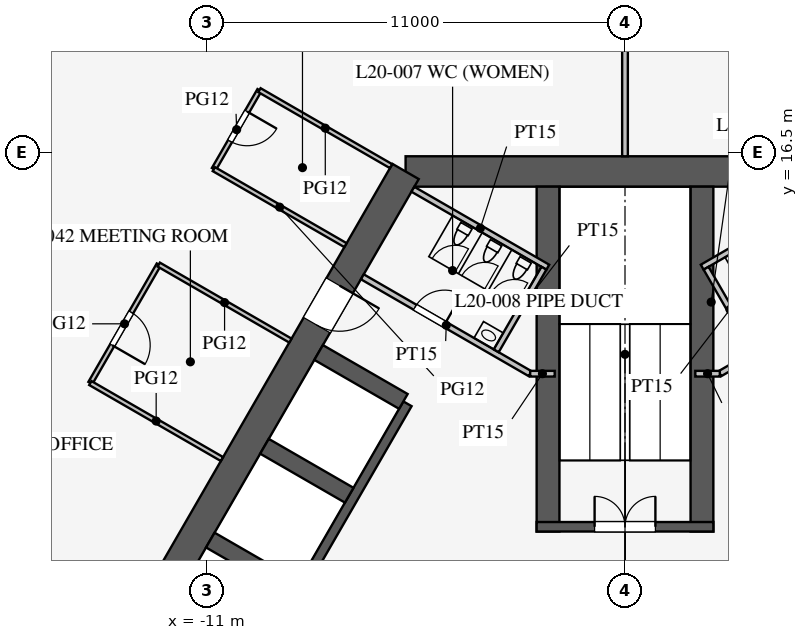
"""IFC4 building model, lengths in metres.
Left out: names, types, materials, properties, quantities, classifications, styles, units other than length and angle.
Written with IfcOpenShell. Run it as: python <this file> out.ifc"""

import sys

from ifc_helpers import new_model, si_unit, direction, frame, frame_2d, origin, place, context, subcontext, project, spatial, rectangle, extrude, element, fill, save


model = new_model("IFC4")
c1 = context("Model", 3, precision=1e-05, world=origin(), true_north=direction((0.0, 1.0)))
c2 = subcontext(c1, "Body", "Model", "MODEL_VIEW")
j1 = project(units=[si_unit("LENGTHUNIT", "METRE"), si_unit("PLANEANGLEUNIT", "RADIAN")], contexts=[c1])
p1 = place(None, origin())
s1 = spatial("IfcSite", under=j1, at=p1, CompositionType="ELEMENT")
p2 = place(p1, origin())
s2 = spatial("IfcBuilding", under=s1, at=p2, CompositionType="ELEMENT")
p3 = place(p2, frame((0.0, 0.0, 87.9)))
s3 = spatial("IfcBuildingStorey", under=s2, at=p3, CompositionType="ELEMENT", Elevation=87.9)
p4 = place(p3, frame((5.773, 16.0, 0.0), z_axis=(0.0, 0.0, 1.0), x_axis=(-1.0, 0.0, 0.0)))
e1 = element("IfcWall", 1, at=p4, inside=s3, PredefinedType="SHEAR", context=c2, shape_type="SweptSolid", body=[
    extrude(rectangle(XDim=11.547, YDim=0.8, at=frame_2d((5.773, 0.0))), origin(), (0.0, 0.0, 1.0), 4.2),
])
p5 = place(p3, frame((-5.773, 16.0, 0.0), z_axis=(0.0, 0.0, 1.0), x_axis=(-0.500002442456, -0.866023993627, 0.0)))
e2 = element("IfcWall", 2, at=p5, inside=s3, PredefinedType="SHEAR", context=c2, shape_type="SweptSolid", body=[
    extrude(rectangle(XDim=21.939, YDim=0.8, at=frame_2d((10.97, 0.0))), origin(), (0.0, 0.0, 1.0), 4.2),
])
p6 = place(p5, frame((17.27, 0.0, 0.0)))
e3 = element("IfcOpeningElement", 3, at=p6, cuts=e2, PredefinedType="OPENING", context=c2, shape_type="SweptSolid", body=[
    extrude(rectangle(XDim=1.2, YDim=2.1, at=frame_2d((0.6, 1.05))), frame((0.0, 0.41, 0.0), z_axis=(0.0, -1.0, 0.0), x_axis=(1.0, 0.0, 0.0)), (0.0, 0.0, 1.0), 0.82),
])
p7 = place(p5, frame((3.47, 0.0, 0.0)))
e4 = element("IfcOpeningElement", 4, at=p7, cuts=e2, PredefinedType="OPENING", context=c2, shape_type="SweptSolid", body=[
    extrude(rectangle(XDim=1.2, YDim=2.1, at=frame_2d((0.6, 1.05))), frame((0.0, 0.41, 0.0), z_axis=(0.0, -1.0, 0.0), x_axis=(1.0, 0.0, 0.0)), (0.0, 0.0, 1.0), 0.82),
])
p8 = place(p3, frame((-5.724, 9.886, 0.0), z_axis=(0.0, 0.0, 1.0), x_axis=(-0.500001763848, -0.866024385424, 0.0)))
e5 = element("IfcWall", 5, at=p8, inside=s3, PredefinedType="SHEAR", context=c2, shape_type="SweptSolid", body=[
    extrude(rectangle(XDim=11.4, YDim=0.25, at=frame_2d((5.7, 0.0))), origin(), (0.0, 0.0, 1.0), 4.2),
])
p9 = place(p8, frame((6.525, 0.0, 0.0)))
e6 = element("IfcOpeningElement", 6, at=p9, cuts=e5, PredefinedType="OPENING", context=c2, shape_type="SweptSolid", body=[
    extrude(rectangle(XDim=1.2, YDim=2.2, at=frame_2d((0.6, 1.1))), frame((0.0, 0.135, 0.0), z_axis=(0.0, -1.0, 0.0), x_axis=(1.0, 0.0, 0.0)), (0.0, 0.0, 1.0), 0.27),
])
p10 = place(p8, frame((9.375, 0.0, 0.0)))
e7 = element("IfcOpeningElement", 7, at=p10, cuts=e5, PredefinedType="OPENING", context=c2, shape_type="SweptSolid", body=[
    extrude(rectangle(XDim=1.2, YDim=2.2, at=frame_2d((0.6, 1.1))), frame((0.0, 0.135, 0.0), z_axis=(0.0, -1.0, 0.0), x_axis=(1.0, 0.0, 0.0)), (0.0, 0.0, 1.0), 0.27),
])
p11 = place(p3, frame((-5.832, 9.949, 0.0), z_axis=(0.0, 0.0, 1.0), x_axis=(-0.866029291668, 0.499993265928, 0.0)))
e8 = element("IfcWall", 8, at=p11, inside=s3, PredefinedType="SHEAR", context=c2, shape_type="SweptSolid", body=[
    extrude(rectangle(XDim=2.575, YDim=0.45, at=frame_2d((1.288, 0.0))), origin(), (0.0, 0.0, 1.0), 4.2),
])
for number, where, z_axis, x_axis in (
    (9, (-7.257, 7.481, 0.0), (0.0, 0.0, 1.0), (-0.866, 0.5, 0.0)),
    (10, (-8.682, 5.012, 0.0), (0.0, 0.0, 1.0), (-0.866, 0.5, 0.0)),
):
    element("IfcWall", number, at=place(p3, frame(where, z_axis=z_axis, x_axis=x_axis)), inside=s3, PredefinedType="SHEAR", context=c2, shape_type="SweptSolid", body=[
        extrude(rectangle(XDim=2.575, YDim=0.45, at=frame_2d((1.288, 0.0))), origin(), (0.0, 0.0, 1.0), 4.2),
    ])
for number, where, z_axis, x_axis in (
    (11, (2.025, 6.525, 0.0), (0.0, 0.0, 1.0), (0.0, 1.0, 0.0)),
    (12, (-2.025, 6.525, 0.0), (0.0, 0.0, 1.0), (0.0, 1.0, 0.0)),
):
    element("IfcWall", number, at=place(p3, frame(where, z_axis=z_axis, x_axis=x_axis)), inside=s3, PredefinedType="SHEAR", context=c2, shape_type="SweptSolid", body=[
        extrude(rectangle(XDim=9.075, YDim=0.6, at=frame_2d((4.538, 0.0))), origin(), (0.0, 0.0, 1.0), 4.2),
    ])
p12 = place(p3, frame((2.325, 6.65, 0.0), z_axis=(0.0, 0.0, 1.0), x_axis=(-1.0, 0.0, 0.0)))
e13 = element("IfcWall", 13, at=p12, inside=s3, PredefinedType="SHEAR", context=c2, shape_type="SweptSolid", body=[
    extrude(rectangle(XDim=4.65, YDim=0.25, at=frame_2d((2.325, 0.0))), origin(), (0.0, 0.0, 1.0), 4.2),
])
p13 = place(p12, frame((1.525, 0.0, 0.0)))
e14 = element("IfcOpeningElement", 14, at=p13, cuts=e13, PredefinedType="OPENING", context=c2, shape_type="SweptSolid", body=[
    extrude(rectangle(XDim=1.6, YDim=2.1, at=frame_2d((0.8, 1.05))), frame((0.0, 0.135, 0.0), z_axis=(0.0, -1.0, 0.0), x_axis=(1.0, 0.0, 0.0)), (0.0, 0.0, 1.0), 0.27),
])
p14 = place(p3, frame((2.495, 10.678, 0.0), z_axis=(0.0, 0.0, 1.0), x_axis=(0.86602216432, 0.500005610874, 0.0)))
e15 = element("IfcWall", 15, at=p14, inside=s3, PredefinedType="PARTITIONING", context=c2, shape_type="SweptSolid", body=[
    extrude(rectangle(XDim=5.1, YDim=0.15, at=frame_2d((2.55, 0.0))), origin(), (0.0, 0.0, 1.0), 3.95),
])
p15 = place(p14, frame((1.3, 0.0, 0.0)))
e16 = element("IfcOpeningElement", 16, at=p15, cuts=e15, PredefinedType="OPENING", context=c2, shape_type="SweptSolid", body=[
    extrude(rectangle(XDim=0.9, YDim=2.1, at=frame_2d((0.45, 1.05))), frame((0.0, 0.085, 0.0), z_axis=(0.0, -1.0, 0.0), x_axis=(1.0, 0.0, 0.0)), (0.0, 0.0, 1.0), 0.17),
])
p16 = place(p3, frame((-2.495, 10.678, 0.0), z_axis=(0.0, 0.0, 1.0), x_axis=(-0.86602216432, 0.500005610874, 0.0)))
e17 = element("IfcWall", 17, at=p16, inside=s3, PredefinedType="PARTITIONING", context=c2, shape_type="SweptSolid", body=[
    extrude(rectangle(XDim=5.1, YDim=0.15, at=frame_2d((2.55, 0.0))), origin(), (0.0, 0.0, 1.0), 3.95),
])
p17 = place(p16, frame((2.6, 0.0, 0.0)))
e18 = element("IfcOpeningElement", 18, at=p17, cuts=e17, PredefinedType="OPENING", context=c2, shape_type="SweptSolid", body=[
    extrude(rectangle(XDim=0.9, YDim=2.1, at=frame_2d((0.45, 1.05))), frame((0.0, 0.085, 0.0), z_axis=(0.0, -1.0, 0.0), x_axis=(1.0, 0.0, 0.0)), (0.0, 0.0, 1.0), 0.17),
])
for number, where, z_axis, x_axis in (
    (19, (2.495, 10.678, 0.0), (0.0, 0.0, 1.0), (-1.0, 0.0, 0.0)),
    (20, (-2.495, 10.678, 0.0), (0.0, 0.0, 1.0), (1.0, 0.0, 0.0)),
):
    element("IfcWall", number, at=place(p3, frame(where, z_axis=z_axis, x_axis=x_axis)), inside=s3, PredefinedType="PARTITIONING", context=c2, shape_type="SweptSolid", body=[
        extrude(rectangle(XDim=0.645, YDim=0.15, at=frame_2d((0.323, 0.0))), origin(), (0.0, 0.0, 1.0), 3.95),
    ])
p18 = place(p3, frame((2.031, 13.482, 0.0), z_axis=(0.0, 0.0, 1.0), x_axis=(0.866050731258, 0.499956128963, 0.0)))
e21 = element("IfcWall", 21, at=p18, inside=s3, PredefinedType="PARTITIONING", context=c2, shape_type="SweptSolid", body=[
    extrude(rectangle(XDim=4.1, YDim=0.15, at=frame_2d((2.05, 0.0))), origin(), (0.0, 0.0, 1.0), 3.95),
])
p19 = place(p3, frame((3.389, 11.281, 0.0), z_axis=(0.0, 0.0, 1.0), x_axis=(-0.499989096993, 0.866031698547, 0.0)))
e22 = element("IfcWall", 22, at=p19, inside=s3, PredefinedType="PARTITIONING", context=c2, shape_type="SweptSolid", body=[
    extrude(rectangle(XDim=2.51, YDim=0.15, at=frame_2d((1.255, 0.0))), origin(), (0.0, 0.0, 1.0), 3.95),
])
p20 = place(p3, frame((-2.031, 13.482, 0.0), z_axis=(0.0, 0.0, 1.0), x_axis=(-0.866050731258, 0.499956128963, 0.0)))
e23 = element("IfcWall", 23, at=p20, inside=s3, PredefinedType="PARTITIONING", context=c2, shape_type="SweptSolid", body=[
    extrude(rectangle(XDim=4.1, YDim=0.15, at=frame_2d((2.05, 0.0))), origin(), (0.0, 0.0, 1.0), 3.95),
])
p21 = place(p3, frame((-3.389, 11.281, 0.0), z_axis=(0.0, 0.0, 1.0), x_axis=(0.499989096993, 0.866031698547, 0.0)))
e24 = element("IfcWall", 24, at=p21, inside=s3, PredefinedType="PARTITIONING", context=c2, shape_type="SweptSolid", body=[
    extrude(rectangle(XDim=2.51, YDim=0.15, at=frame_2d((1.255, 0.0))), origin(), (0.0, 0.0, 1.0), 3.95),
])
p22 = place(p3, frame((0.0, 16.4, 0.0), z_axis=(0.0, 0.0, 1.0), x_axis=(0.0, 1.0, 0.0)))
e25 = element("IfcWall", 25, at=p22, inside=s3, PredefinedType="PARTITIONING", context=c2, shape_type="SweptSolid", body=[
    extrude(rectangle(XDim=18.25, YDim=0.15, at=frame_2d((9.125, 0.0))), origin(), (0.0, 0.0, 1.0), 1.95),
])
p23 = place(p3, frame((-9.619, 18.14, 0.0), z_axis=(0.0, 0.0, 1.0), x_axis=(-0.500001309137, -0.866024647952, 0.0)))
e26 = element("IfcWall", 26, at=p23, inside=s3, PredefinedType="PARTITIONING", context=c2, shape_type="SweptSolid", body=[
    extrude(rectangle(XDim=2.4, YDim=0.12, at=frame_2d((1.2, 0.0))), origin(), (0.0, 0.0, 1.0), 2.9),
])
p24 = place(p23, frame((0.65, 0.0, 0.15)))
e27 = element("IfcOpeningElement", 27, at=p24, cuts=e26, PredefinedType="OPENING", context=c2, shape_type="SweptSolid", body=[
    extrude(rectangle(XDim=0.9, YDim=2.1, at=frame_2d((0.45, 1.05))), frame((0.0, 0.07, 0.0), z_axis=(0.0, -1.0, 0.0), x_axis=(1.0, 0.0, 0.0)), (0.0, 0.0, 1.0), 0.14),
])
p25 = place(p3, frame((-12.269, 13.55, 0.0), z_axis=(0.0, 0.0, 1.0), x_axis=(-0.500012057535, -0.866018442252, 0.0)))
e28 = element("IfcWall", 28, at=p25, inside=s3, PredefinedType="PARTITIONING", context=c2, shape_type="SweptSolid", body=[
    extrude(rectangle(XDim=3.6, YDim=0.12, at=frame_2d((1.8, 0.0))), origin(), (0.0, 0.0, 1.0), 2.9),
])
p26 = place(p25, frame((1.45, 0.0, 0.15)))
e29 = element("IfcOpeningElement", 29, at=p26, cuts=e28, PredefinedType="OPENING", context=c2, shape_type="SweptSolid", body=[
    extrude(rectangle(XDim=1.0, YDim=2.1, at=frame_2d((0.5, 1.05))), frame((0.0, 0.07, 0.0), z_axis=(0.0, -1.0, 0.0), x_axis=(1.0, 0.0, 0.0)), (0.0, 0.0, 1.0), 0.14),
])
for number, where, z_axis, x_axis in (
    (30, (-6.155, 16.14, 0.0), (0.0, 0.0, 1.0), (-0.866, 0.5, 0.0)),
    (31, (-10.605, 8.432, 0.0), (0.0, 0.0, 1.0), (-0.866, 0.5, 0.0)),
    (32, (-8.805, 11.55, 0.0), (0.0, 0.0, 1.0), (-0.866, 0.5, 0.0)),
    (33, (-7.355, 14.061, 0.0), (0.0, 0.0, 1.0), (-0.866, 0.5, 0.0)),
):
    element("IfcWall", number, at=place(p3, frame(where, z_axis=z_axis, x_axis=x_axis)), inside=s3, PredefinedType="PARTITIONING", context=c2, shape_type="SweptSolid", body=[
        extrude(rectangle(XDim=4.0, YDim=0.12, at=frame_2d((2.0, 0.0))), origin(), (0.0, 0.0, 1.0), 2.9),
    ])
p27 = place(p17, frame((0.9, 0.0, 0.0), z_axis=(0.0, 0.0, 1.0), x_axis=(-1.0, 0.0, 0.0)))
e34 = element("IfcDoor", 34, at=p27, inside=s3, OperationType="SINGLE_SWING_RIGHT", PredefinedType="DOOR", context=c2, shape_type="SweptSolid", body=[
    extrude(rectangle(XDim=0.9, YDim=2.1, at=frame_2d((0.45, 1.05))), frame((0.0, 0.025, 0.0), z_axis=(0.0, -1.0, 0.0), x_axis=(1.0, 0.0, 0.0)), (0.0, 0.0, 1.0), 0.05),
])
fill(e18, e34)
p28 = place(p13, frame((1.6, 0.0, 0.0), z_axis=(0.0, 0.0, 1.0), x_axis=(-1.0, 0.0, 0.0)))
e35 = element("IfcDoor", 35, at=p28, inside=s3, OperationType="DOUBLE_DOOR_SINGLE_SWING", PredefinedType="DOOR", context=c2, shape_type="SweptSolid", body=[
    extrude(rectangle(XDim=1.6, YDim=2.1, at=frame_2d((0.8, 1.05))), frame((0.0, 0.025, 0.0), z_axis=(0.0, -1.0, 0.0), x_axis=(1.0, 0.0, 0.0)), (0.0, 0.0, 1.0), 0.05),
])
fill(e14, e35)
p29 = place(p7, origin())
e36 = element("IfcDoor", 36, at=p29, inside=s3, OperationType="SINGLE_SWING_LEFT", PredefinedType="DOOR", context=c2, shape_type="SweptSolid", body=[
    extrude(rectangle(XDim=1.2, YDim=2.1, at=frame_2d((0.6, 1.05))), frame((0.0, 0.025, 0.0), z_axis=(0.0, -1.0, 0.0), x_axis=(1.0, 0.0, 0.0)), (0.0, 0.0, 1.0), 0.05),
])
fill(e4, e36)
p30 = place(p26, origin())
e37 = element("IfcDoor", 37, at=p30, inside=s3, OperationType="SINGLE_SWING_RIGHT", PredefinedType="DOOR", context=c2, shape_type="SweptSolid", body=[
    extrude(rectangle(XDim=1.0, YDim=2.1, at=frame_2d((0.5, 1.05))), frame((0.0, 0.025, 0.0), z_axis=(0.0, -1.0, 0.0), x_axis=(1.0, 0.0, 0.0)), (0.0, 0.0, 1.0), 0.05),
])
fill(e29, e37)
p31 = place(p24, origin())
e38 = element("IfcDoor", 38, at=p31, inside=s3, OperationType="SINGLE_SWING_LEFT", PredefinedType="DOOR", context=c2, shape_type="SweptSolid", body=[
    extrude(rectangle(XDim=0.9, YDim=2.1, at=frame_2d((0.45, 1.05))), frame((0.0, 0.025, 0.0), z_axis=(0.0, -1.0, 0.0), x_axis=(1.0, 0.0, 0.0)), (0.0, 0.0, 1.0), 0.05),
])
fill(e27, e38)
save(model, sys.argv[1])
